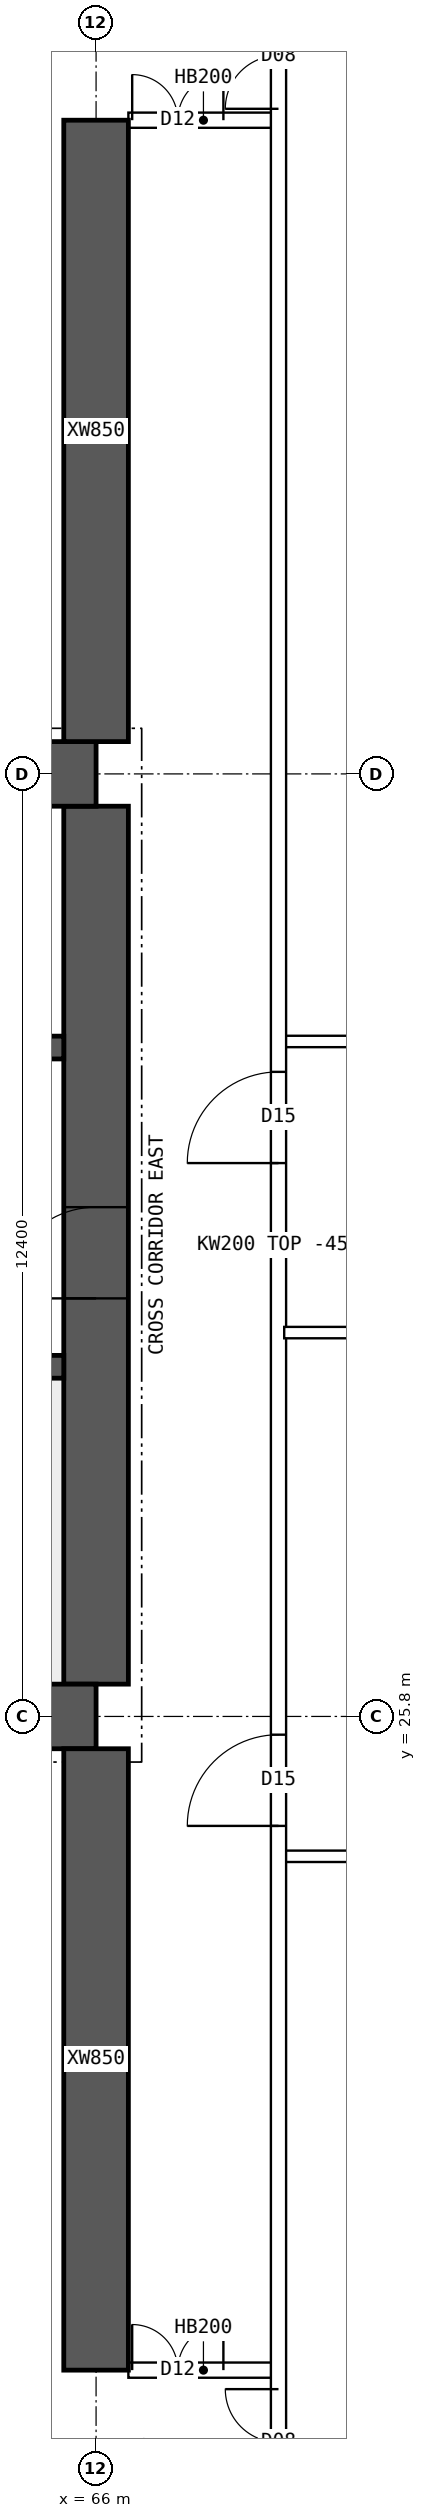
"""IFC4 building model, lengths in metres.
Left out: names, types, materials, properties, quantities, classifications, styles, units other than length and angle.
Written with IfcOpenShell. Run it as: python <this file> out.ifc"""

import sys

from ifc_helpers import new_model, si_unit, direction, frame, frame_2d, origin, place, context, subcontext, project, spatial, polyline, rectangle, outline, extrude, element, fill, save


model = new_model("IFC4")
c1 = context("Model", 3, precision=1e-05, world=origin(), true_north=direction((0.0, 1.0)))
c2 = subcontext(c1, "Body", "Model", "MODEL_VIEW")
j1 = project(units=[si_unit("LENGTHUNIT", "METRE"), si_unit("PLANEANGLEUNIT", "RADIAN")], contexts=[c1])
p1 = place(None, origin())
s1 = spatial("IfcSite", under=j1, at=p1, CompositionType="ELEMENT")
p2 = place(p1, origin())
s2 = spatial("IfcBuilding", under=s1, at=p2, CompositionType="ELEMENT")
p3 = place(p2, frame((0.0, 0.0, 174.85)))
s3 = spatial("IfcBuildingStorey", under=s2, at=p3, CompositionType="ELEMENT", Elevation=174.85)
for number, where, z_axis, x_axis in (
    (1, (18.0, 25.8, 0.0), (0.0, 0.0, 1.0), (1.0, 0.0, 0.0)),
    (2, (18.0, 38.2, 0.0), (0.0, 0.0, 1.0), (1.0, 0.0, 0.0)),
):
    element("IfcWall", number, at=place(p3, frame(where, z_axis=z_axis, x_axis=x_axis)), inside=s3, PredefinedType="SHEAR", context=c2, shape_type="SweptSolid", body=[
        extrude(rectangle(XDim=48.0, YDim=0.85, at=frame_2d((24.0, 0.0))), origin(), (0.0, 0.0, 1.0), 3.75),
    ])
p4 = place(p3, frame((66.0, 26.225, 0.0), z_axis=(0.0, 0.0, 1.0), x_axis=(0.0, 1.0, 0.0)))
e3 = element("IfcWall", 3, at=p4, inside=s3, PredefinedType="SHEAR", context=c2, shape_type="SweptSolid", body=[
    extrude(rectangle(XDim=11.55, YDim=0.85, at=frame_2d((5.775, 0.0))), origin(), (0.0, 0.0, 1.0), 3.75),
])
p5 = place(p4, frame((5.075, 0.0, 0.0)))
e4 = element("IfcOpeningElement", 4, at=p5, cuts=e3, PredefinedType="OPENING", context=c2, shape_type="SweptSolid", body=[
    extrude(rectangle(XDim=1.2, YDim=2.1, at=frame_2d((0.6, 1.05))), frame((0.0, 0.435, 0.0), z_axis=(0.0, -1.0, 0.0), x_axis=(1.0, 0.0, 0.0)), (0.0, 0.0, 1.0), 0.87),
])
p6 = place(p3, frame((18.425, 30.4, 0.0), z_axis=(0.0, 0.0, 1.0), x_axis=(1.0, 0.0, 0.0)))
e5 = element("IfcWall", 5, at=p6, inside=s3, PredefinedType="SHEAR", context=c2, shape_type="SweptSolid", body=[
    extrude(rectangle(XDim=47.15, YDim=0.3, at=frame_2d((23.575, 0.0))), origin(), (0.0, 0.0, 1.0), 3.75),
])
p7 = place(p6, frame((0.4, 0.0, 0.0)))
e6 = element("IfcOpeningElement", 6, at=p7, cuts=e5, PredefinedType="OPENING", context=c2, shape_type="SweptSolid", body=[
    extrude(rectangle(XDim=1.0, YDim=2.1, at=frame_2d((0.5, 1.05))), frame((0.0, 0.16, 0.0), z_axis=(0.0, -1.0, 0.0), x_axis=(1.0, 0.0, 0.0)), (0.0, 0.0, 1.0), 0.32),
])
p8 = place(p6, frame((45.75, 0.0, 0.0)))
e7 = element("IfcOpeningElement", 7, at=p8, cuts=e5, PredefinedType="OPENING", context=c2, shape_type="SweptSolid", body=[
    extrude(rectangle(XDim=1.0, YDim=2.1, at=frame_2d((0.5, 1.05))), frame((0.0, 0.16, 0.0), z_axis=(0.0, -1.0, 0.0), x_axis=(1.0, 0.0, 0.0)), (0.0, 0.0, 1.0), 0.32),
])
p9 = place(p6, frame((8.325, 0.0, 0.0)))
e8 = element("IfcOpeningElement", 8, at=p9, cuts=e5, PredefinedType="OPENING", context=c2, shape_type="SweptSolid", body=[
    extrude(rectangle(XDim=1.1, YDim=2.1, at=frame_2d((0.55, 1.05))), frame((0.0, 0.16, 0.0), z_axis=(0.0, -1.0, 0.0), x_axis=(1.0, 0.0, 0.0)), (0.0, 0.0, 1.0), 0.32),
])
p10 = place(p6, frame((10.925, 0.0, 0.0)))
e9 = element("IfcOpeningElement", 9, at=p10, cuts=e5, PredefinedType="OPENING", context=c2, shape_type="SweptSolid", body=[
    extrude(rectangle(XDim=1.1, YDim=2.1, at=frame_2d((0.55, 1.05))), frame((0.0, 0.16, 0.0), z_axis=(0.0, -1.0, 0.0), x_axis=(1.0, 0.0, 0.0)), (0.0, 0.0, 1.0), 0.32),
])
p11 = place(p6, frame((13.525, 0.0, 0.0)))
e10 = element("IfcOpeningElement", 10, at=p11, cuts=e5, PredefinedType="OPENING", context=c2, shape_type="SweptSolid", body=[
    extrude(rectangle(XDim=1.1, YDim=2.1, at=frame_2d((0.55, 1.05))), frame((0.0, 0.16, 0.0), z_axis=(0.0, -1.0, 0.0), x_axis=(1.0, 0.0, 0.0)), (0.0, 0.0, 1.0), 0.32),
])
p12 = place(p6, frame((16.125, 0.0, 0.0)))
e11 = element("IfcOpeningElement", 11, at=p12, cuts=e5, PredefinedType="OPENING", context=c2, shape_type="SweptSolid", body=[
    extrude(rectangle(XDim=1.1, YDim=2.1, at=frame_2d((0.55, 1.05))), frame((0.0, 0.16, 0.0), z_axis=(0.0, -1.0, 0.0), x_axis=(1.0, 0.0, 0.0)), (0.0, 0.0, 1.0), 0.32),
])
p13 = place(p6, frame((18.9, 0.0, 0.0)))
e12 = element("IfcOpeningElement", 12, at=p13, cuts=e5, PredefinedType="OPENING", context=c2, shape_type="SweptSolid", body=[
    extrude(rectangle(XDim=0.9, YDim=2.1, at=frame_2d((0.45, 1.05))), frame((0.0, 0.16, 0.0), z_axis=(0.0, -1.0, 0.0), x_axis=(1.0, 0.0, 0.0)), (0.0, 0.0, 1.0), 0.32),
])
p14 = place(p6, frame((30.192, 0.0, 0.0)))
e13 = element("IfcOpeningElement", 13, at=p14, cuts=e5, PredefinedType="OPENING", context=c2, shape_type="SweptSolid", body=[
    extrude(rectangle(XDim=1.1, YDim=2.1, at=frame_2d((0.55, 1.05))), frame((0.0, 0.16, 0.0), z_axis=(0.0, -1.0, 0.0), x_axis=(1.0, 0.0, 0.0)), (0.0, 0.0, 1.0), 0.32),
])
p15 = place(p6, frame((33.725, 0.0, 0.0)))
e14 = element("IfcOpeningElement", 14, at=p15, cuts=e5, PredefinedType="OPENING", context=c2, shape_type="SweptSolid", body=[
    extrude(rectangle(XDim=1.1, YDim=2.1, at=frame_2d((0.55, 1.05))), frame((0.0, 0.16, 0.0), z_axis=(0.0, -1.0, 0.0), x_axis=(1.0, 0.0, 0.0)), (0.0, 0.0, 1.0), 0.32),
])
p16 = place(p6, frame((37.258, 0.0, 0.0)))
e15 = element("IfcOpeningElement", 15, at=p16, cuts=e5, PredefinedType="OPENING", context=c2, shape_type="SweptSolid", body=[
    extrude(rectangle(XDim=1.1, YDim=2.1, at=frame_2d((0.55, 1.05))), frame((0.0, 0.16, 0.0), z_axis=(0.0, -1.0, 0.0), x_axis=(1.0, 0.0, 0.0)), (0.0, 0.0, 1.0), 0.32),
])
p17 = place(p3, frame((18.425, 34.6, 0.0), z_axis=(0.0, 0.0, 1.0), x_axis=(1.0, 0.0, 0.0)))
e16 = element("IfcWall", 16, at=p17, inside=s3, PredefinedType="SHEAR", context=c2, shape_type="SweptSolid", body=[
    extrude(rectangle(XDim=47.15, YDim=0.3, at=frame_2d((23.575, 0.0))), origin(), (0.0, 0.0, 1.0), 3.75),
])
p18 = place(p17, frame((0.9, 0.0, 0.0)))
e17 = element("IfcOpeningElement", 17, at=p18, cuts=e16, PredefinedType="OPENING", context=c2, shape_type="SweptSolid", body=[
    extrude(rectangle(XDim=1.1, YDim=2.1, at=frame_2d((0.55, 1.05))), frame((0.0, 0.16, 0.0), z_axis=(0.0, -1.0, 0.0), x_axis=(1.0, 0.0, 0.0)), (0.0, 0.0, 1.0), 0.32),
])
p19 = place(p17, frame((45.15, 0.0, 0.0)))
e18 = element("IfcOpeningElement", 18, at=p19, cuts=e16, PredefinedType="OPENING", context=c2, shape_type="SweptSolid", body=[
    extrude(rectangle(XDim=1.1, YDim=2.1, at=frame_2d((0.55, 1.05))), frame((0.0, 0.16, 0.0), z_axis=(0.0, -1.0, 0.0), x_axis=(1.0, 0.0, 0.0)), (0.0, 0.0, 1.0), 0.32),
])
p20 = place(p17, frame((4.175, 0.0, 0.0)))
e19 = element("IfcOpeningElement", 19, at=p20, cuts=e16, PredefinedType="OPENING", context=c2, shape_type="SweptSolid", body=[
    extrude(rectangle(XDim=0.9, YDim=2.1, at=frame_2d((0.45, 1.05))), frame((0.0, 0.16, 0.0), z_axis=(0.0, -1.0, 0.0), x_axis=(1.0, 0.0, 0.0)), (0.0, 0.0, 1.0), 0.32),
])
p21 = place(p17, frame((42.075, 0.0, 0.0)))
e20 = element("IfcOpeningElement", 20, at=p21, cuts=e16, PredefinedType="OPENING", context=c2, shape_type="SweptSolid", body=[
    extrude(rectangle(XDim=0.9, YDim=2.1, at=frame_2d((0.45, 1.05))), frame((0.0, 0.16, 0.0), z_axis=(0.0, -1.0, 0.0), x_axis=(1.0, 0.0, 0.0)), (0.0, 0.0, 1.0), 0.32),
])
p22 = place(p17, frame((8.95, 0.0, 0.0)))
e21 = element("IfcOpeningElement", 21, at=p22, cuts=e16, PredefinedType="OPENING", context=c2, shape_type="SweptSolid", body=[
    extrude(rectangle(XDim=0.9, YDim=2.1, at=frame_2d((0.45, 1.05))), frame((0.0, 0.16, 0.0), z_axis=(0.0, -1.0, 0.0), x_axis=(1.0, 0.0, 0.0)), (0.0, 0.0, 1.0), 0.32),
])
p23 = place(p17, frame((12.924, 0.0, 0.0)))
e22 = element("IfcOpeningElement", 22, at=p23, cuts=e16, PredefinedType="OPENING", context=c2, shape_type="SweptSolid", body=[
    extrude(rectangle(XDim=0.9, YDim=2.1, at=frame_2d((0.45, 1.05))), frame((0.0, 0.16, 0.0), z_axis=(0.0, -1.0, 0.0), x_axis=(1.0, 0.0, 0.0)), (0.0, 0.0, 1.0), 0.32),
])
p24 = place(p17, frame((16.571, 0.0, 0.0)))
e23 = element("IfcOpeningElement", 23, at=p24, cuts=e16, PredefinedType="OPENING", context=c2, shape_type="SweptSolid", body=[
    extrude(rectangle(XDim=0.9, YDim=2.1, at=frame_2d((0.45, 1.05))), frame((0.0, 0.16, 0.0), z_axis=(0.0, -1.0, 0.0), x_axis=(1.0, 0.0, 0.0)), (0.0, 0.0, 1.0), 0.32),
])
p25 = place(p17, frame((20.33, 0.0, 0.0)))
e24 = element("IfcOpeningElement", 24, at=p25, cuts=e16, PredefinedType="OPENING", context=c2, shape_type="SweptSolid", body=[
    extrude(rectangle(XDim=0.9, YDim=2.1, at=frame_2d((0.45, 1.05))), frame((0.0, 0.16, 0.0), z_axis=(0.0, -1.0, 0.0), x_axis=(1.0, 0.0, 0.0)), (0.0, 0.0, 1.0), 0.32),
])
p26 = place(p17, frame((24.736, 0.0, 0.0)))
e25 = element("IfcOpeningElement", 25, at=p26, cuts=e16, PredefinedType="OPENING", context=c2, shape_type="SweptSolid", body=[
    extrude(rectangle(XDim=0.9, YDim=2.1, at=frame_2d((0.45, 1.05))), frame((0.0, 0.16, 0.0), z_axis=(0.0, -1.0, 0.0), x_axis=(1.0, 0.0, 0.0)), (0.0, 0.0, 1.0), 0.32),
])
p27 = place(p17, frame((27.533, 0.0, 0.0)))
e26 = element("IfcOpeningElement", 26, at=p27, cuts=e16, PredefinedType="OPENING", context=c2, shape_type="SweptSolid", body=[
    extrude(rectangle(XDim=0.9, YDim=2.1, at=frame_2d((0.45, 1.05))), frame((0.0, 0.16, 0.0), z_axis=(0.0, -1.0, 0.0), x_axis=(1.0, 0.0, 0.0)), (0.0, 0.0, 1.0), 0.32),
])
p28 = place(p17, frame((29.5, 0.0, 0.0)))
e27 = element("IfcOpeningElement", 27, at=p28, cuts=e16, PredefinedType="OPENING", context=c2, shape_type="SweptSolid", body=[
    extrude(rectangle(XDim=0.9, YDim=2.1, at=frame_2d((0.45, 1.05))), frame((0.0, 0.16, 0.0), z_axis=(0.0, -1.0, 0.0), x_axis=(1.0, 0.0, 0.0)), (0.0, 0.0, 1.0), 0.32),
])
p29 = place(p17, frame((31.932, 0.0, 0.0)))
e28 = element("IfcOpeningElement", 28, at=p29, cuts=e16, PredefinedType="OPENING", context=c2, shape_type="SweptSolid", body=[
    extrude(rectangle(XDim=0.9, YDim=2.1, at=frame_2d((0.45, 1.05))), frame((0.0, 0.16, 0.0), z_axis=(0.0, -1.0, 0.0), x_axis=(1.0, 0.0, 0.0)), (0.0, 0.0, 1.0), 0.32),
])
p30 = place(p17, frame((34.667, 0.0, 0.0)))
e29 = element("IfcOpeningElement", 29, at=p30, cuts=e16, PredefinedType="OPENING", context=c2, shape_type="SweptSolid", body=[
    extrude(rectangle(XDim=0.9, YDim=2.1, at=frame_2d((0.45, 1.05))), frame((0.0, 0.16, 0.0), z_axis=(0.0, -1.0, 0.0), x_axis=(1.0, 0.0, 0.0)), (0.0, 0.0, 1.0), 0.32),
])
p31 = place(p17, frame((37.707, 0.0, 0.0)))
e30 = element("IfcOpeningElement", 30, at=p31, cuts=e16, PredefinedType="OPENING", context=c2, shape_type="SweptSolid", body=[
    extrude(rectangle(XDim=0.9, YDim=2.1, at=frame_2d((0.45, 1.05))), frame((0.0, 0.16, 0.0), z_axis=(0.0, -1.0, 0.0), x_axis=(1.0, 0.0, 0.0)), (0.0, 0.0, 1.0), 0.32),
])
for number, where, z_axis, x_axis in (
    (31, (66.0, 17.2, 0.0), (0.0, 0.0, 1.0), (0.0, 1.0, 0.0)),
    (32, (66.0, 38.625, 0.0), (0.0, 0.0, 1.0), (0.0, 1.0, 0.0)),
):
    element("IfcWall", number, at=place(p3, frame(where, z_axis=z_axis, x_axis=x_axis)), inside=s3, PredefinedType="SHEAR", context=c2, shape_type="SweptSolid", body=[
        extrude(rectangle(XDim=8.175, YDim=0.85, at=frame_2d((4.087, 0.0))), origin(), (0.0, 0.0, 1.0), 3.75),
    ])
p32 = place(p3, frame((66.425, 17.2, 0.0), z_axis=(0.0, 0.0, 1.0), x_axis=(1.0, 0.0, 0.0)))
e33 = element("IfcWall", 33, at=p32, inside=s3, PredefinedType="SOLIDWALL", context=c2, shape_type="SweptSolid", body=[
    extrude(rectangle(XDim=1.975, YDim=0.2, at=frame_2d((0.987, 0.0))), origin(), (0.0, 0.0, 1.0), 3.3),
])
p33 = place(p32, frame((0.05, 0.0, 0.0)))
e34 = element("IfcOpeningElement", 34, at=p33, cuts=e33, PredefinedType="OPENING", context=c2, shape_type="SweptSolid", body=[
    extrude(rectangle(XDim=1.2, YDim=2.1, at=frame_2d((0.6, 1.05))), frame((0.0, 0.11, 0.0), z_axis=(0.0, -1.0, 0.0), x_axis=(1.0, 0.0, 0.0)), (0.0, 0.0, 1.0), 0.22),
])
p34 = place(p3, frame((66.425, 46.8, 0.0), z_axis=(0.0, 0.0, 1.0), x_axis=(1.0, 0.0, 0.0)))
e35 = element("IfcWall", 35, at=p34, inside=s3, PredefinedType="SOLIDWALL", context=c2, shape_type="SweptSolid", body=[
    extrude(rectangle(XDim=1.975, YDim=0.2, at=frame_2d((0.987, 0.0))), origin(), (0.0, 0.0, 1.0), 3.3),
])
p35 = place(p34, frame((0.05, 0.0, 0.0)))
e36 = element("IfcOpeningElement", 36, at=p35, cuts=e35, PredefinedType="OPENING", context=c2, shape_type="SweptSolid", body=[
    extrude(rectangle(XDim=1.2, YDim=2.1, at=frame_2d((0.6, 1.05))), frame((0.0, 0.11, 0.0), z_axis=(0.0, -1.0, 0.0), x_axis=(1.0, 0.0, 0.0)), (0.0, 0.0, 1.0), 0.22),
])
p36 = place(p3, frame((68.475, 30.85, 0.0), z_axis=(0.0, 0.0, 1.0), x_axis=(1.0, 0.0, 0.0)))
e37 = element("IfcWall", 37, at=p36, inside=s3, PredefinedType="PARTITIONING", context=c2, shape_type="SweptSolid", body=[
    extrude(outline(polyline([(0.0, 0.0), (6.82, 0.0), (6.82, 3.3), (3.827, 3.3), (3.825, 2.85), (3.227, 2.85), (3.225, 3.3), (0.0, 3.3), (0.0, 0.0)])), frame((0.0, 0.075, 0.0), z_axis=(0.0, -1.0, 0.0), x_axis=(1.0, 0.0, 0.0)), (0.0, 0.0, 1.0), 0.15),
])
p37 = place(p3, frame((68.4, 10.446, 0.0), z_axis=(0.0, 0.0, 1.0), x_axis=(0.0, 1.0, 0.0)))
e38 = element("IfcWall", 38, at=p37, inside=s3, PredefinedType="SOLIDWALL", context=c2, shape_type="SweptSolid", body=[
    extrude(rectangle(XDim=43.107, YDim=0.2, at=frame_2d((21.554, 0.0))), origin(), (0.0, 0.0, 1.0), 3.3),
])
p38 = place(p37, frame((13.914, 0.0, 0.0)))
e39 = element("IfcOpeningElement", 39, at=p38, cuts=e38, PredefinedType="OPENING", context=c2, shape_type="SweptSolid", body=[
    extrude(rectangle(XDim=1.2, YDim=2.1, at=frame_2d((0.6, 1.05))), frame((0.0, 0.11, 0.0), z_axis=(0.0, -1.0, 0.0), x_axis=(1.0, 0.0, 0.0)), (0.0, 0.0, 1.0), 0.22),
])
p39 = place(p37, frame((22.634, 0.0, 0.0)))
e40 = element("IfcOpeningElement", 40, at=p39, cuts=e38, PredefinedType="OPENING", context=c2, shape_type="SweptSolid", body=[
    extrude(rectangle(XDim=1.2, YDim=2.1, at=frame_2d((0.6, 1.05))), frame((0.0, 0.11, 0.0), z_axis=(0.0, -1.0, 0.0), x_axis=(1.0, 0.0, 0.0)), (0.0, 0.0, 1.0), 0.22),
])
p40 = place(p37, frame((5.104, 0.0, 0.0)))
e41 = element("IfcOpeningElement", 41, at=p40, cuts=e38, PredefinedType="OPENING", context=c2, shape_type="SweptSolid", body=[
    extrude(rectangle(XDim=1.4, YDim=2.1, at=frame_2d((0.7, 1.05))), frame((0.0, 0.11, 0.0), z_axis=(0.0, -1.0, 0.0), x_axis=(1.0, 0.0, 0.0)), (0.0, 0.0, 1.0), 0.22),
])
p41 = place(p37, frame((36.504, 0.0, 0.0)))
e42 = element("IfcOpeningElement", 42, at=p41, cuts=e38, PredefinedType="OPENING", context=c2, shape_type="SweptSolid", body=[
    extrude(rectangle(XDim=1.4, YDim=2.1, at=frame_2d((0.7, 1.05))), frame((0.0, 0.11, 0.0), z_axis=(0.0, -1.0, 0.0), x_axis=(1.0, 0.0, 0.0)), (0.0, 0.0, 1.0), 0.22),
])
p42 = place(p3, frame((68.475, 23.96, 0.0), z_axis=(0.0, 0.0, 1.0), x_axis=(1.0, 0.0, 0.0)))
e43 = element("IfcWall", 43, at=p42, inside=s3, PredefinedType="PARTITIONING", context=c2, shape_type="SweptSolid", body=[
    extrude(rectangle(XDim=6.82, YDim=0.15, at=frame_2d((3.41, 0.0))), origin(), (0.0, 0.0, 1.0), 3.3),
])
p43 = place(p3, frame((68.475, 34.68, 0.0), z_axis=(0.0, 0.0, 1.0), x_axis=(1.0, 0.0, 0.0)))
e44 = element("IfcWall", 44, at=p43, inside=s3, PredefinedType="PARTITIONING", context=c2, shape_type="SweptSolid", body=[
    extrude(outline(polyline([(0.0, 0.0), (6.82, 0.0), (6.82, 3.3), (3.827, 3.3), (3.825, 2.85), (3.227, 2.85), (3.225, 3.3), (0.0, 3.3), (0.0, 0.0)])), frame((0.0, 0.075, 0.0), z_axis=(0.0, -1.0, 0.0), x_axis=(1.0, 0.0, 0.0)), (0.0, 0.0, 1.0), 0.15),
])
p44 = place(p5, origin())
e45 = element("IfcDoor", 45, at=p44, inside=s3, OperationType="SINGLE_SWING_LEFT", PredefinedType="DOOR", context=c2, shape_type="SweptSolid", body=[
    extrude(rectangle(XDim=1.2, YDim=2.1, at=frame_2d((0.6, 1.05))), frame((0.0, 0.025, 0.0), z_axis=(0.0, -1.0, 0.0), x_axis=(1.0, 0.0, 0.0)), (0.0, 0.0, 1.0), 0.05),
])
fill(e4, e45)
p45 = place(p33, origin())
e46 = element("IfcDoor", 46, at=p45, inside=s3, OperationType="DOUBLE_DOOR_SINGLE_SWING", PredefinedType="DOOR", context=c2, shape_type="SweptSolid", body=[
    extrude(rectangle(XDim=1.2, YDim=2.1, at=frame_2d((0.6, 1.05))), frame((0.0, 0.025, 0.0), z_axis=(0.0, -1.0, 0.0), x_axis=(1.0, 0.0, 0.0)), (0.0, 0.0, 1.0), 0.05),
])
fill(e34, e46)
p46 = place(p35, origin())
e47 = element("IfcDoor", 47, at=p46, inside=s3, OperationType="DOUBLE_DOOR_SINGLE_SWING", PredefinedType="DOOR", context=c2, shape_type="SweptSolid", body=[
    extrude(rectangle(XDim=1.2, YDim=2.1, at=frame_2d((0.6, 1.05))), frame((0.0, 0.025, 0.0), z_axis=(0.0, -1.0, 0.0), x_axis=(1.0, 0.0, 0.0)), (0.0, 0.0, 1.0), 0.05),
])
fill(e36, e47)
p47 = place(p38, origin())
e48 = element("IfcDoor", 48, at=p47, inside=s3, OperationType="SINGLE_SWING_LEFT", PredefinedType="DOOR", context=c2, shape_type="SweptSolid", body=[
    extrude(rectangle(XDim=1.2, YDim=2.1, at=frame_2d((0.6, 1.05))), frame((0.0, 0.025, 0.0), z_axis=(0.0, -1.0, 0.0), x_axis=(1.0, 0.0, 0.0)), (0.0, 0.0, 1.0), 0.05),
])
fill(e39, e48)
p48 = place(p39, origin())
e49 = element("IfcDoor", 49, at=p48, inside=s3, OperationType="SINGLE_SWING_LEFT", PredefinedType="DOOR", context=c2, shape_type="SweptSolid", body=[
    extrude(rectangle(XDim=1.2, YDim=2.1, at=frame_2d((0.6, 1.05))), frame((0.0, 0.025, 0.0), z_axis=(0.0, -1.0, 0.0), x_axis=(1.0, 0.0, 0.0)), (0.0, 0.0, 1.0), 0.05),
])
fill(e40, e49)
p49 = place(p40, origin())
e50 = element("IfcDoor", 50, at=p49, inside=s3, OperationType="DOUBLE_DOOR_SINGLE_SWING", PredefinedType="DOOR", context=c2, shape_type="SweptSolid", body=[
    extrude(rectangle(XDim=1.4, YDim=2.1, at=frame_2d((0.7, 1.05))), frame((0.0, 0.025, 0.0), z_axis=(0.0, -1.0, 0.0), x_axis=(1.0, 0.0, 0.0)), (0.0, 0.0, 1.0), 0.05),
])
fill(e41, e50)
p50 = place(p41, origin())
e51 = element("IfcDoor", 51, at=p50, inside=s3, OperationType="DOUBLE_DOOR_SINGLE_SWING", PredefinedType="DOOR", context=c2, shape_type="SweptSolid", body=[
    extrude(rectangle(XDim=1.4, YDim=2.1, at=frame_2d((0.7, 1.05))), frame((0.0, 0.025, 0.0), z_axis=(0.0, -1.0, 0.0), x_axis=(1.0, 0.0, 0.0)), (0.0, 0.0, 1.0), 0.05),
])
fill(e42, e51)
save(model, sys.argv[1])
